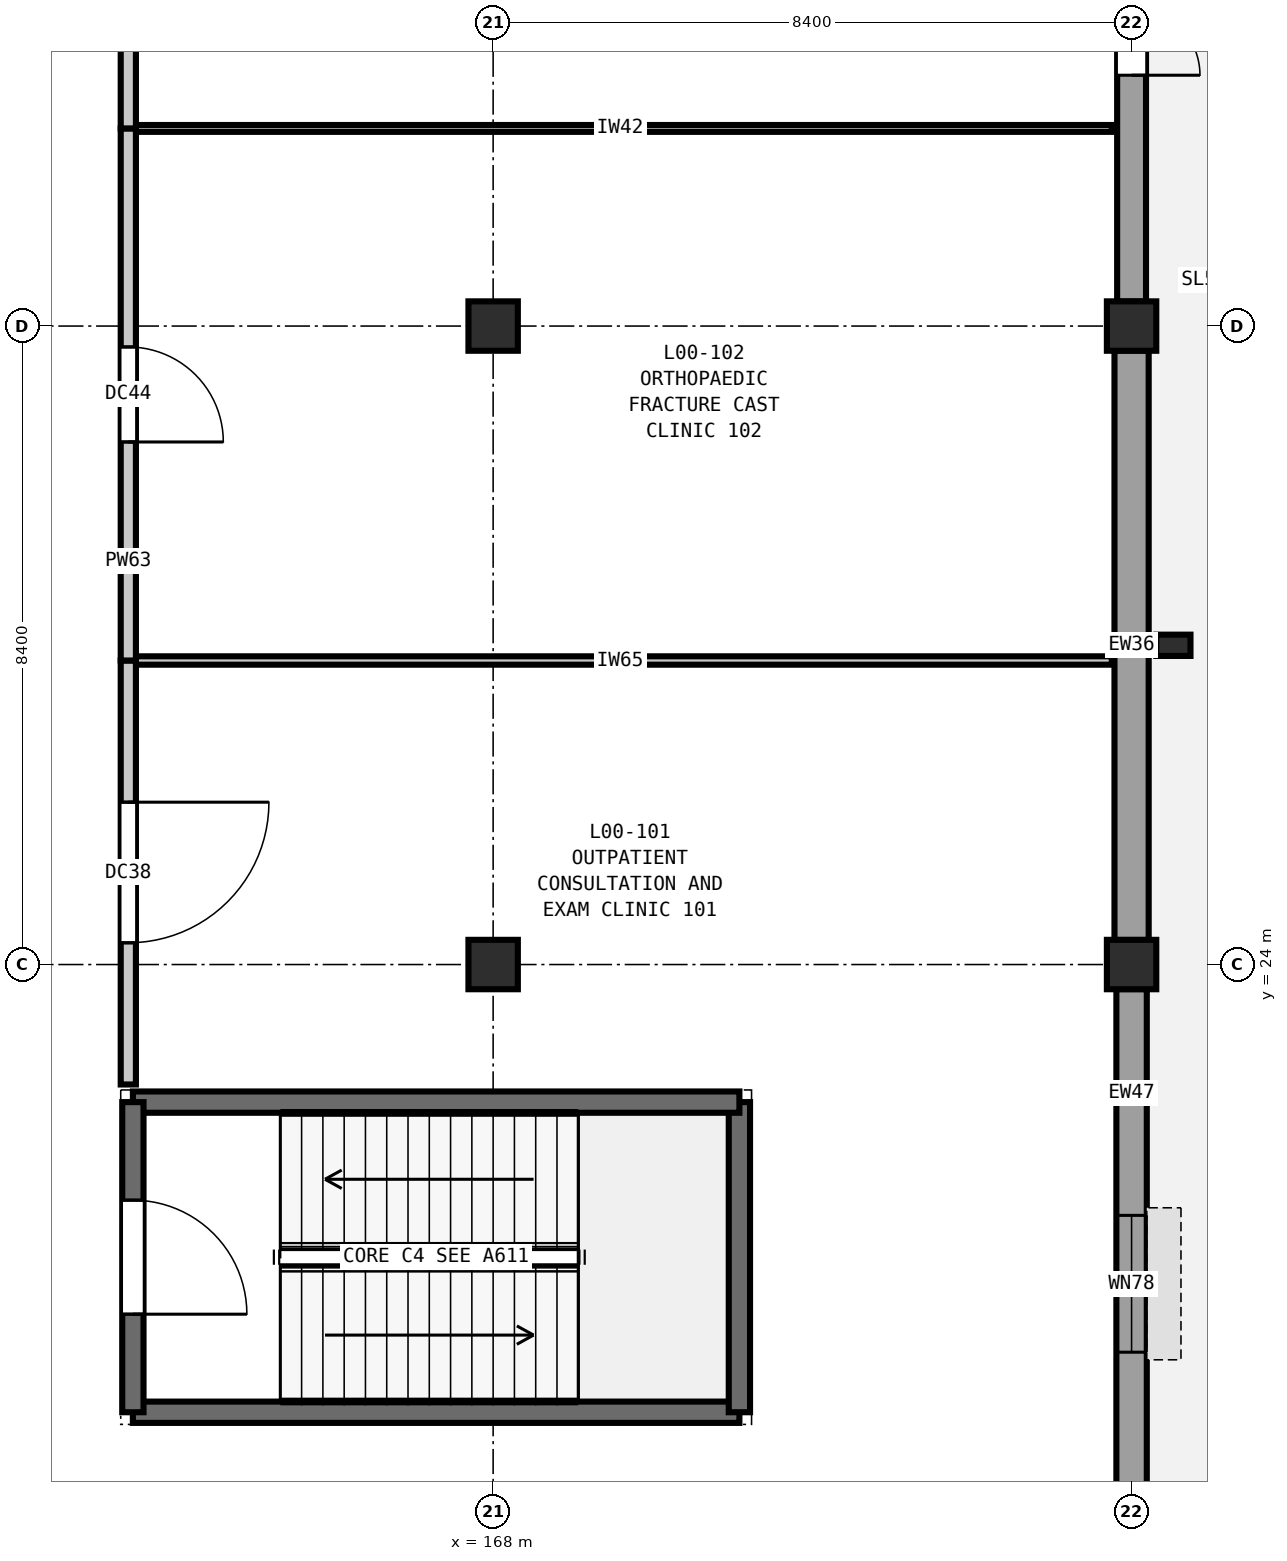
"""IFC4 building model, lengths in metres.
Left out: names, types, materials, properties, quantities, classifications, styles, units other than length and angle.
Written with IfcOpenShell. Run it as: python <this file> out.ifc"""

import sys

from ifc_helpers import new_model, si_unit, direction, frame, frame_2d, origin, origin_2d, place, context, subcontext, project, spatial, rectangle, extrude, element, fill, save


model = new_model("IFC4")
c1 = context("Model", 3, precision=1e-05, world=origin(), true_north=direction((0.0, 1.0)))
c2 = subcontext(c1, "Body", "Model", "MODEL_VIEW")
j1 = project(units=[si_unit("LENGTHUNIT", "METRE"), si_unit("PLANEANGLEUNIT", "RADIAN")], contexts=[c1])
p1 = place(None, origin())
s1 = spatial("IfcSite", under=j1, at=p1, CompositionType="ELEMENT")
p2 = place(p1, origin())
s2 = spatial("IfcBuilding", under=s1, at=p2, CompositionType="ELEMENT")
p3 = place(p2, origin())
s3 = spatial("IfcBuildingStorey", under=s2, at=p3, CompositionType="ELEMENT", Elevation=0.0)
for number, where, z_axis, x_axis in (
    (1, (168.0, 24.0, 0.0), (0.0, 0.0, 1.0), (1.0, 0.0, 0.0)),
    (2, (168.0, 32.4, 0.0), (0.0, 0.0, 1.0), (1.0, 0.0, 0.0)),
    (3, (176.4, 24.0, 0.0), (0.0, 0.0, 1.0), (1.0, 0.0, 0.0)),
    (4, (176.4, 32.4, 0.0), (0.0, 0.0, 1.0), (1.0, 0.0, 0.0)),
):
    element("IfcColumn", number, at=place(p3, frame(where, z_axis=z_axis, x_axis=x_axis)), inside=s3, PredefinedType="COLUMN", context=c2, shape_type="SweptSolid", body=[
        extrude(rectangle(XDim=0.65, YDim=0.65, at=origin_2d()), origin(), (0.0, 0.0, 1.0), 5.4),
    ])
p4 = place(p3, frame((176.95, 28.2, 0.0), z_axis=(0.0, 0.0, 1.0), x_axis=(1.0, 0.0, 0.0)))
e5 = element("IfcColumn", 5, at=p4, inside=s3, PredefinedType="PILASTER", context=c2, shape_type="SweptSolid", body=[
    extrude(rectangle(XDim=0.45, YDim=0.28, at=origin_2d()), origin(), (0.0, 0.0, 1.0), 5.4),
])
p5 = place(p3, frame((176.4, 40.477, 0.0), z_axis=(0.0, 0.0, 1.0), x_axis=(0.0, -1.0, 0.0)))
e6 = element("IfcWall", 6, at=p5, inside=s3, PredefinedType="SOLIDWALL", context=c2, shape_type="SweptSolid", body=[
    extrude(rectangle(XDim=7.754, YDim=0.38, at=frame_2d((3.877, 0.0))), origin(), (0.0, 0.0, 1.0), 4.68),
])
p6 = place(p5, frame((2.977, 0.0, 0.0)))
e7 = element("IfcOpeningElement", 7, at=p6, cuts=e6, PredefinedType="OPENING", context=c2, shape_type="SweptSolid", body=[
    extrude(rectangle(XDim=1.8, YDim=2.25, at=frame_2d((0.9, 1.125))), frame((0.0, 0.2, 0.0), z_axis=(0.0, -1.0, 0.0), x_axis=(1.0, 0.0, 0.0)), (0.0, 0.0, 1.0), 0.4),
])
p7 = place(p3, frame((176.4, 32.077, 0.0), z_axis=(0.0, 0.0, 1.0), x_axis=(0.0, -1.0, 0.0)))
e8 = element("IfcWall", 8, at=p7, inside=s3, PredefinedType="SOLIDWALL", context=c2, shape_type="SweptSolid", body=[
    extrude(rectangle(XDim=7.754, YDim=0.45, at=frame_2d((3.877, 0.0))), origin(), (0.0, 0.0, 1.0), 4.68),
])
p8 = place(p3, frame((176.4, 23.677, 0.0), z_axis=(0.0, 0.0, 1.0), x_axis=(0.0, -1.0, 0.0)))
e9 = element("IfcWall", 9, at=p8, inside=s3, PredefinedType="SOLIDWALL", context=c2, shape_type="SweptSolid", body=[
    extrude(rectangle(XDim=7.754, YDim=0.4, at=frame_2d((3.877, 0.0))), origin(), (0.0, 0.0, 1.0), 4.68),
])
p9 = place(p8, frame((2.977, 0.0, 0.9)))
e10 = element("IfcOpeningElement", 10, at=p9, cuts=e9, PredefinedType="OPENING", context=c2, shape_type="SweptSolid", body=[
    extrude(rectangle(XDim=1.8, YDim=1.95, at=frame_2d((0.9, 0.975))), frame((0.0, 0.21, 0.0), z_axis=(0.0, -1.0, 0.0), x_axis=(1.0, 0.0, 0.0)), (0.0, 0.0, 1.0), 0.42),
])
p10 = place(p3, frame((163.26, 18.11, 0.0), z_axis=(0.0, 0.0, 1.0), x_axis=(1.0, 0.0, 0.0)))
e11 = element("IfcWall", 11, at=p10, inside=s3, PredefinedType="SHEAR", context=c2, shape_type="SweptSolid", body=[
    extrude(rectangle(XDim=7.98, YDim=0.28, at=frame_2d((3.99, 0.0))), origin(), (0.0, 0.0, 1.0), 5.4),
])
p11 = place(p3, frame((171.24, 18.11, 0.0), z_axis=(0.0, 0.0, 1.0), x_axis=(0.0, 1.0, 0.0)))
e12 = element("IfcWall", 12, at=p11, inside=s3, PredefinedType="SHEAR", context=c2, shape_type="SweptSolid", body=[
    extrude(rectangle(XDim=4.08, YDim=0.28, at=frame_2d((2.04, 0.0))), origin(), (0.0, 0.0, 1.0), 5.4),
])
p12 = place(p3, frame((171.24, 22.19, 0.0), z_axis=(0.0, 0.0, 1.0), x_axis=(-1.0, 0.0, 0.0)))
e13 = element("IfcWall", 13, at=p12, inside=s3, PredefinedType="SHEAR", context=c2, shape_type="SweptSolid", body=[
    extrude(rectangle(XDim=7.98, YDim=0.28, at=frame_2d((3.99, 0.0))), origin(), (0.0, 0.0, 1.0), 5.4),
])
p13 = place(p3, frame((163.26, 22.19, 0.0), z_axis=(0.0, 0.0, 1.0), x_axis=(0.0, -1.0, 0.0)))
e14 = element("IfcWall", 14, at=p13, inside=s3, PredefinedType="SHEAR", context=c2, shape_type="SweptSolid", body=[
    extrude(rectangle(XDim=4.08, YDim=0.28, at=frame_2d((2.04, 0.0))), origin(), (0.0, 0.0, 1.0), 5.4),
])
p14 = place(p13, frame((1.29, 0.0, 0.0)))
e15 = element("IfcOpeningElement", 15, at=p14, cuts=e14, PredefinedType="OPENING", context=c2, shape_type="SweptSolid", body=[
    extrude(rectangle(XDim=1.5, YDim=2.2, at=frame_2d((0.75, 1.1))), frame((0.0, 0.15, 0.0), z_axis=(0.0, -1.0, 0.0), x_axis=(1.0, 0.0, 0.0)), (0.0, 0.0, 1.0), 0.3),
])
p15 = place(p3, frame((163.2, 28.0, 0.0), z_axis=(0.0, 0.0, 1.0), x_axis=(1.0, 0.0, 0.0)))
e16 = element("IfcWall", 16, at=p15, inside=s3, PredefinedType="PARTITIONING", context=c2, shape_type="SweptSolid", body=[
    extrude(rectangle(XDim=12.94, YDim=0.11, at=frame_2d((6.47, 0.0))), origin(), (0.0, 0.0, 1.0), 5.04),
])
p16 = place(p3, frame((163.2, 35.0, 0.0), z_axis=(0.0, 0.0, 1.0), x_axis=(1.0, 0.0, 0.0)))
e17 = element("IfcWall", 17, at=p16, inside=s3, PredefinedType="PARTITIONING", context=c2, shape_type="SweptSolid", body=[
    extrude(rectangle(XDim=12.94, YDim=0.09, at=frame_2d((6.47, 0.0))), origin(), (0.0, 0.0, 1.0), 5.04),
])
p17 = place(p3, frame((163.2, 22.422, 0.0), z_axis=(0.0, 0.0, 1.0), x_axis=(0.0, 1.0, 0.0)))
e18 = element("IfcWall", 18, at=p17, inside=s3, PredefinedType="PARTITIONING", context=c2, shape_type="SweptSolid", body=[
    extrude(rectangle(XDim=5.578, YDim=0.2, at=frame_2d((2.789, 0.0))), origin(), (0.0, 0.0, 1.0), 5.04),
])
p18 = place(p17, frame((1.864, 0.0, 0.0)))
e19 = element("IfcOpeningElement", 19, at=p18, cuts=e18, PredefinedType="OPENING", context=c2, shape_type="SweptSolid", body=[
    extrude(rectangle(XDim=1.85, YDim=2.3, at=frame_2d((0.925, 1.15))), frame((0.0, 0.11, 0.0), z_axis=(0.0, -1.0, 0.0), x_axis=(1.0, 0.0, 0.0)), (0.0, 0.0, 1.0), 0.22),
])
p19 = place(p3, frame((163.2, 28.0, 0.0), z_axis=(0.0, 0.0, 1.0), x_axis=(0.0, 1.0, 0.0)))
e20 = element("IfcWall", 20, at=p19, inside=s3, PredefinedType="PARTITIONING", context=c2, shape_type="SweptSolid", body=[
    extrude(rectangle(XDim=7.0, YDim=0.2, at=frame_2d((3.5, 0.0))), origin(), (0.0, 0.0, 1.0), 5.04),
])
p20 = place(p19, frame((2.875, 0.0, 0.0)))
e21 = element("IfcOpeningElement", 21, at=p20, cuts=e20, PredefinedType="OPENING", context=c2, shape_type="SweptSolid", body=[
    extrude(rectangle(XDim=1.25, YDim=2.15, at=frame_2d((0.625, 1.075))), frame((0.0, 0.11, 0.0), z_axis=(0.0, -1.0, 0.0), x_axis=(1.0, 0.0, 0.0)), (0.0, 0.0, 1.0), 0.22),
])
p21 = place(p3, frame((163.2, 35.0, 0.0), z_axis=(0.0, 0.0, 1.0), x_axis=(0.0, 1.0, 0.0)))
e22 = element("IfcWall", 22, at=p21, inside=s3, PredefinedType="PARTITIONING", context=c2, shape_type="SweptSolid", body=[
    extrude(rectangle(XDim=11.2, YDim=0.2, at=frame_2d((5.6, 0.0))), origin(), (0.0, 0.0, 1.0), 5.04),
])
p22 = place(p21, frame((4.95, 0.0, 0.0)))
e23 = element("IfcOpeningElement", 23, at=p22, cuts=e22, PredefinedType="OPENING", context=c2, shape_type="SweptSolid", body=[
    extrude(rectangle(XDim=1.3, YDim=2.2, at=frame_2d((0.65, 1.1))), frame((0.0, 0.11, 0.0), z_axis=(0.0, -1.0, 0.0), x_axis=(1.0, 0.0, 0.0)), (0.0, 0.0, 1.0), 0.22),
])
p23 = place(p6, origin())
e24 = element("IfcDoor", 24, at=p23, inside=s3, OperationType="DOUBLE_DOOR_SINGLE_SWING", PredefinedType="DOOR", context=c2, shape_type="SweptSolid", body=[
    extrude(rectangle(XDim=1.8, YDim=2.25, at=frame_2d((0.9, 1.125))), frame((0.0, 0.025, 0.0), z_axis=(0.0, -1.0, 0.0), x_axis=(1.0, 0.0, 0.0)), (0.0, 0.0, 1.0), 0.05),
])
fill(e7, e24)
p24 = place(p9, origin())
e25 = element("IfcWindow", 25, at=p24, inside=s3, PartitioningType="DOUBLE_PANEL_VERTICAL", PredefinedType="WINDOW", context=c2, shape_type="SweptSolid", body=[
    extrude(rectangle(XDim=1.8, YDim=1.95, at=frame_2d((0.9, 0.975))), frame((0.0, 0.03, 0.0), z_axis=(0.0, -1.0, 0.0), x_axis=(1.0, 0.0, 0.0)), (0.0, 0.0, 1.0), 0.06),
])
fill(e10, e25)
p25 = place(p14, origin())
e26 = element("IfcDoor", 26, at=p25, inside=s3, OperationType="SINGLE_SWING_RIGHT", PredefinedType="DOOR", context=c2, shape_type="SweptSolid", body=[
    extrude(rectangle(XDim=1.5, YDim=2.2, at=frame_2d((0.75, 1.1))), frame((0.0, 0.025, 0.0), z_axis=(0.0, -1.0, 0.0), x_axis=(1.0, 0.0, 0.0)), (0.0, 0.0, 1.0), 0.05),
])
fill(e15, e26)
p26 = place(p18, frame((1.85, 0.0, 0.0), z_axis=(0.0, 0.0, 1.0), x_axis=(-1.0, 0.0, 0.0)))
e27 = element("IfcDoor", 27, at=p26, inside=s3, OperationType="SINGLE_SWING_LEFT", PredefinedType="DOOR", context=c2, shape_type="SweptSolid", body=[
    extrude(rectangle(XDim=1.85, YDim=2.3, at=frame_2d((0.925, 1.15))), frame((0.0, 0.025, 0.0), z_axis=(0.0, -1.0, 0.0), x_axis=(1.0, 0.0, 0.0)), (0.0, 0.0, 1.0), 0.05),
])
fill(e19, e27)
p27 = place(p20, frame((1.25, 0.0, 0.0), z_axis=(0.0, 0.0, 1.0), x_axis=(-1.0, 0.0, 0.0)))
e28 = element("IfcDoor", 28, at=p27, inside=s3, OperationType="SINGLE_SWING_RIGHT", PredefinedType="DOOR", context=c2, shape_type="SweptSolid", body=[
    extrude(rectangle(XDim=1.25, YDim=2.15, at=frame_2d((0.625, 1.075))), frame((0.0, 0.025, 0.0), z_axis=(0.0, -1.0, 0.0), x_axis=(1.0, 0.0, 0.0)), (0.0, 0.0, 1.0), 0.05),
])
fill(e21, e28)
save(model, sys.argv[1])
